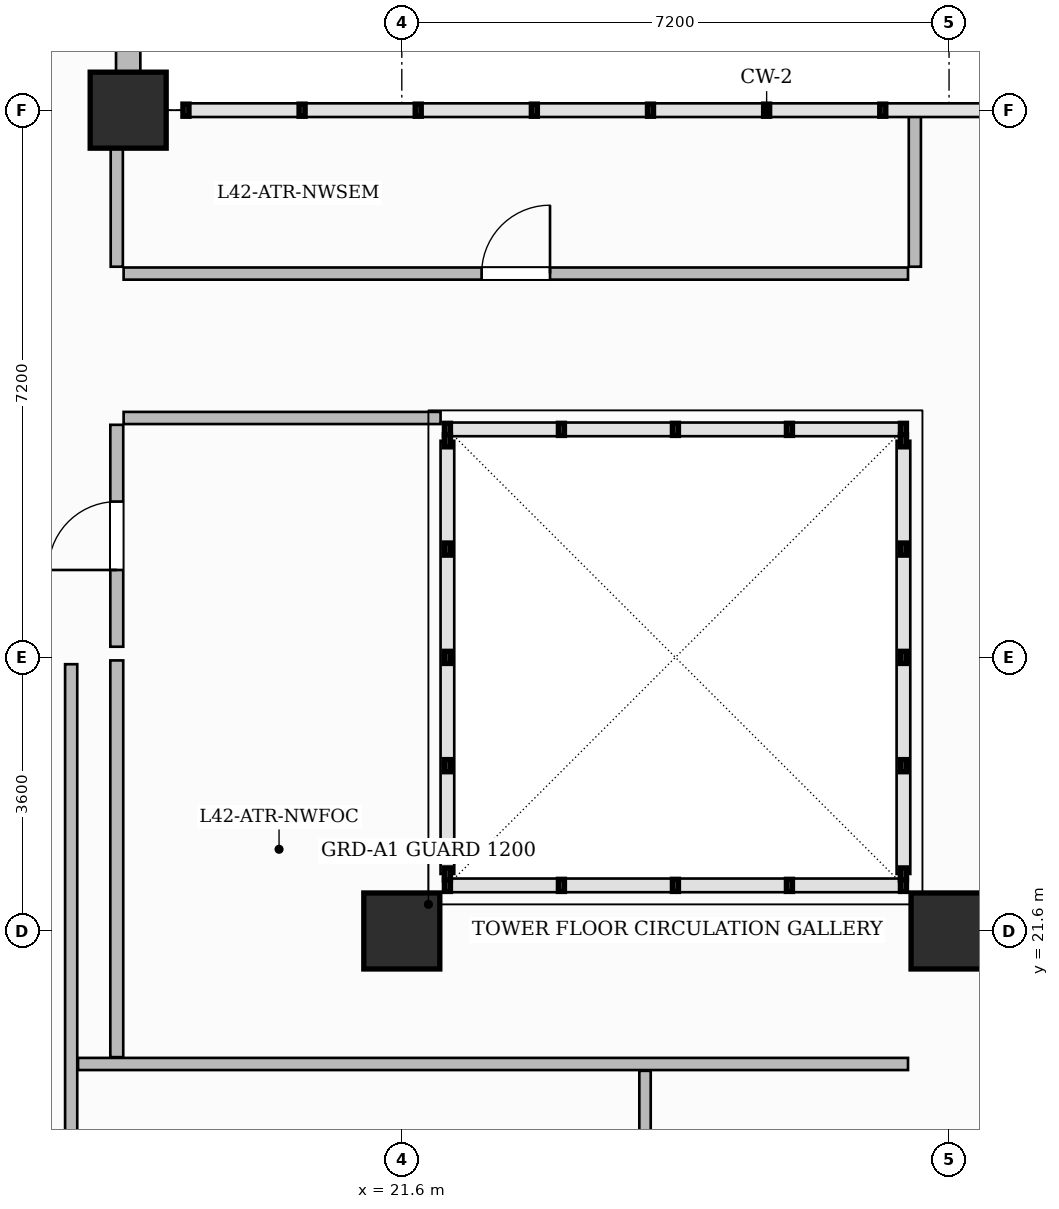
"""IFC4 building model, lengths in metres.
Left out: names, types, materials, properties, quantities, classifications, styles, units other than length and angle.
Written with IfcOpenShell. Run it as: python <this file> out.ifc"""

import sys

from ifc_helpers import new_model, si_unit, direction, frame, frame_2d, origin, origin_2d, place, context, subcontext, project, spatial, rectangle, extrude, source, transform, mapped, element, fill, save


model = new_model("IFC4")
c1 = context("Model", 3, precision=1e-05, world=origin(), true_north=direction((0.0, 1.0)))
c2 = subcontext(c1, "Body", "Model", "MODEL_VIEW")
j1 = project(units=[si_unit("LENGTHUNIT", "METRE"), si_unit("PLANEANGLEUNIT", "RADIAN")], contexts=[c1])
p1 = place(None, origin())
s1 = spatial("IfcSite", under=j1, at=p1, CompositionType="ELEMENT")
p2 = place(p1, origin())
s2 = spatial("IfcBuilding", under=s1, at=p2, CompositionType="ELEMENT")
p3 = place(p2, frame((0.0, 0.0, 169.55)))
s3 = spatial("IfcBuildingStorey", under=s2, at=p3, CompositionType="ELEMENT", Elevation=169.55)
m1 = source(origin(), c2, "Body", "SweptSolid", [
    extrude(rectangle(XDim=1.0, YDim=1.0, at=origin_2d()), origin(), (0.0, 0.0, 1.0), 3.85),
])
for number, where, z_axis, x_axis in (
    (1, (21.6, 21.6, 0.0), (0.0, 0.0, 1.0), (1.0, 0.0, 0.0)),
    (2, (28.8, 21.6, 0.0), (0.0, 0.0, 1.0), (1.0, 0.0, 0.0)),
    (3, (18.0, 32.4, 0.0), (0.0, 0.0, 1.0), (1.0, 0.0, 0.0)),
):
    element("IfcColumn", number, at=place(p3, frame(where, z_axis=z_axis, x_axis=x_axis)), inside=s3, PredefinedType="COLUMN", context=c2, shape_type="MappedRepresentation", body=[
        mapped(m1, transform((0.0, 0.0, 0.0), scale=1.0)),
    ])
p4 = place(p3, frame((17.25, 11.16, 0.0), z_axis=(0.0, 0.0, 1.0), x_axis=(0.0, 1.0, 0.0)))
e4 = element("IfcWall", 4, at=p4, inside=s3, PredefinedType="PARTITIONING", context=c2, shape_type="SweptSolid", body=[
    extrude(rectangle(XDim=13.95, YDim=0.16, at=frame_2d((6.975, 0.0))), origin(), (0.0, 0.0, 1.0), 3.6),
])
p5 = place(p3, frame((17.85, 19.94, 0.0), z_axis=(0.0, 0.0, 1.0), x_axis=(0.0, 1.0, 0.0)))
e5 = element("IfcWall", 5, at=p5, inside=s3, PredefinedType="PARTITIONING", context=c2, shape_type="SweptSolid", body=[
    extrude(rectangle(XDim=5.22, YDim=0.17, at=frame_2d((2.61, 0.0))), origin(), (0.0, 0.0, 1.0), 3.285),
])
p6 = place(p3, frame((17.85, 30.34, 0.0), z_axis=(0.0, 0.0, 1.0), x_axis=(0.0, 1.0, 0.0)))
e6 = element("IfcWall", 6, at=p6, inside=s3, PredefinedType="PARTITIONING", context=c2, shape_type="SweptSolid", body=[
    extrude(rectangle(XDim=1.87, YDim=0.16, at=frame_2d((0.935, 0.0))), origin(), (0.0, 0.0, 1.0), 3.6),
])
p7 = place(p3, frame((28.35, 30.34, 0.0), z_axis=(0.0, 0.0, 1.0), x_axis=(0.0, 1.0, 0.0)))
e7 = element("IfcWall", 7, at=p7, inside=s3, PredefinedType="PARTITIONING", context=c2, shape_type="SweptSolid", body=[
    extrude(rectangle(XDim=2.032, YDim=0.16, at=frame_2d((1.016, 0.0))), origin(), (0.0, 0.0, 1.0), 3.6),
])
p8 = place(p3, frame((17.94, 28.35, 0.0), z_axis=(0.0, 0.0, 1.0), x_axis=(1.0, 0.0, 0.0)))
e8 = element("IfcWall", 8, at=p8, inside=s3, PredefinedType="PARTITIONING", context=c2, shape_type="SweptSolid", body=[
    extrude(rectangle(XDim=4.17, YDim=0.16, at=frame_2d((2.085, 0.0))), origin(), (0.0, 0.0, 1.0), 3.6),
])
p9 = place(p3, frame((17.94, 30.25, 0.0), z_axis=(0.0, 0.0, 1.0), x_axis=(1.0, 0.0, 0.0)))
e9 = element("IfcWall", 9, at=p9, inside=s3, PredefinedType="PARTITIONING", context=c2, shape_type="SweptSolid", body=[
    extrude(rectangle(XDim=10.32, YDim=0.16, at=frame_2d((5.16, 0.0))), origin(), (0.0, 0.0, 1.0), 3.6),
])
p10 = place(p9, frame((4.71, 0.0, 0.0)))
e10 = element("IfcOpeningElement", 10, at=p10, cuts=e9, PredefinedType="OPENING", context=c2, shape_type="SweptSolid", body=[
    extrude(rectangle(XDim=0.9, YDim=2.15, at=frame_2d((0.45, 1.075))), frame((0.0, 0.09, 0.0), z_axis=(0.0, -1.0, 0.0), x_axis=(1.0, 0.0, 0.0)), (0.0, 0.0, 1.0), 0.18),
])
p11 = place(p3, frame((17.85, 25.34, 0.0), z_axis=(0.0, 0.0, 1.0), x_axis=(0.0, 1.0, 0.0)))
e11 = element("IfcWall", 11, at=p11, inside=s3, PredefinedType="PARTITIONING", context=c2, shape_type="SweptSolid", body=[
    extrude(rectangle(XDim=2.92, YDim=0.17, at=frame_2d((1.46, 0.0))), origin(), (0.0, 0.0, 1.0), 3.6),
])
p12 = place(p11, frame((1.01, 0.0, 0.0)))
e12 = element("IfcOpeningElement", 12, at=p12, cuts=e11, PredefinedType="OPENING", context=c2, shape_type="SweptSolid", body=[
    extrude(rectangle(XDim=0.9, YDim=2.15, at=frame_2d((0.45, 1.075))), frame((0.0, 0.095, 0.0), z_axis=(0.0, -1.0, 0.0), x_axis=(1.0, 0.0, 0.0)), (0.0, 0.0, 1.0), 0.19),
])
p13 = place(p3, frame((17.34, 19.85, 0.0), z_axis=(0.0, 0.0, 1.0), x_axis=(1.0, 0.0, 0.0)))
e13 = element("IfcWall", 13, at=p13, inside=s3, PredefinedType="PARTITIONING", context=c2, shape_type="SweptSolid", body=[
    extrude(rectangle(XDim=10.92, YDim=0.16, at=frame_2d((5.46, 0.0))), origin(), (0.0, 0.0, 1.0), 3.6),
])
p14 = place(p3, frame((24.8, 11.16, 0.0), z_axis=(0.0, 0.0, 1.0), x_axis=(0.0, 1.0, 0.0)))
e14 = element("IfcWall", 14, at=p14, inside=s3, PredefinedType="PARTITIONING", context=c2, shape_type="SweptSolid", body=[
    extrude(rectangle(XDim=8.6, YDim=0.15, at=frame_2d((4.3, 0.0))), origin(), (0.0, 0.0, 1.0), 3.6),
])
p15 = place(p14, frame((0.535, 0.0, 0.0)))
e15 = element("IfcOpeningElement", 15, at=p15, cuts=e14, PredefinedType="OPENING", context=c2, shape_type="SweptSolid", body=[
    extrude(rectangle(XDim=0.9, YDim=2.15, at=frame_2d((0.45, 1.075))), frame((0.0, 0.085, 0.0), z_axis=(0.0, -1.0, 0.0), x_axis=(1.0, 0.0, 0.0)), (0.0, 0.0, 1.0), 0.17),
])
p16 = place(p3, frame((18.0, 32.4, 0.0), z_axis=(0.0, 0.0, 1.0), x_axis=(0.0, 1.0, 0.0)))
e16 = element("IfcWall", 16, at=p16, inside=s3, PredefinedType="SOLIDWALL", context=c2, shape_type="SweptSolid", body=[
    extrude(rectangle(XDim=14.35, YDim=0.32, at=frame_2d((7.175, 0.0))), origin(), (0.0, 0.0, 1.0), 3.6),
])
p17 = place(p16, frame((0.85, 0.0, 0.0)))
e17 = element("IfcOpeningElement", 17, at=p17, cuts=e16, PredefinedType="OPENING", context=c2, shape_type="SweptSolid", body=[
    extrude(rectangle(XDim=1.2, YDim=2.2, at=frame_2d((0.6, 1.1))), frame((0.0, 0.17, 0.0), z_axis=(0.0, -1.0, 0.0), x_axis=(1.0, 0.0, 0.0)), (0.0, 0.0, 1.0), 0.34),
])
p18 = place(p16, frame((3.475, 0.0, 0.8)))
e18 = element("IfcOpeningElement", 18, at=p18, cuts=e16, PredefinedType="OPENING", context=c2, shape_type="SweptSolid", body=[
    extrude(rectangle(XDim=1.8, YDim=1.85, at=frame_2d((0.9, 0.925))), frame((0.0, 0.17, 0.0), z_axis=(0.0, -1.0, 0.0), x_axis=(1.0, 0.0, 0.0)), (0.0, 0.0, 1.0), 0.34),
])
p19 = place(p16, frame((8.525, 0.0, 0.8)))
e19 = element("IfcOpeningElement", 19, at=p19, cuts=e16, PredefinedType="OPENING", context=c2, shape_type="SweptSolid", body=[
    extrude(rectangle(XDim=1.8, YDim=1.85, at=frame_2d((0.9, 0.925))), frame((0.0, 0.17, 0.0), z_axis=(0.0, -1.0, 0.0), x_axis=(1.0, 0.0, 0.0)), (0.0, 0.0, 1.0), 0.34),
])
p20 = place(p16, frame((11.275, 0.0, 0.8)))
e20 = element("IfcOpeningElement", 20, at=p20, cuts=e16, PredefinedType="OPENING", context=c2, shape_type="SweptSolid", body=[
    extrude(rectangle(XDim=1.8, YDim=1.85, at=frame_2d((0.9, 0.925))), frame((0.0, 0.17, 0.0), z_axis=(0.0, -1.0, 0.0), x_axis=(1.0, 0.0, 0.0)), (0.0, 0.0, 1.0), 0.34),
])
m2 = source(origin(), c2, "Body", "SweptSolid", [
    extrude(rectangle(XDim=0.9, YDim=2.15, at=frame_2d((0.45, 1.075))), frame((0.0, 0.025, 0.0), z_axis=(0.0, -1.0, 0.0), x_axis=(1.0, 0.0, 0.0)), (0.0, 0.0, 1.0), 0.05),
])
p21 = place(p12, origin())
e21 = element("IfcDoor", 21, at=p21, inside=s3, OperationType="SINGLE_SWING_LEFT", PredefinedType="DOOR", context=c2, shape_type="MappedRepresentation", body=[
    mapped(m2, transform((0.0, 0.0, 0.0), scale=1.0)),
])
fill(e12, e21)
p22 = place(p10, origin())
e22 = element("IfcDoor", 22, at=p22, inside=s3, OperationType="SINGLE_SWING_RIGHT", PredefinedType="DOOR", context=c2, shape_type="MappedRepresentation", body=[
    mapped(m2, transform((0.0, 0.0, 0.0), scale=1.0)),
])
fill(e10, e22)
save(model, sys.argv[1])
